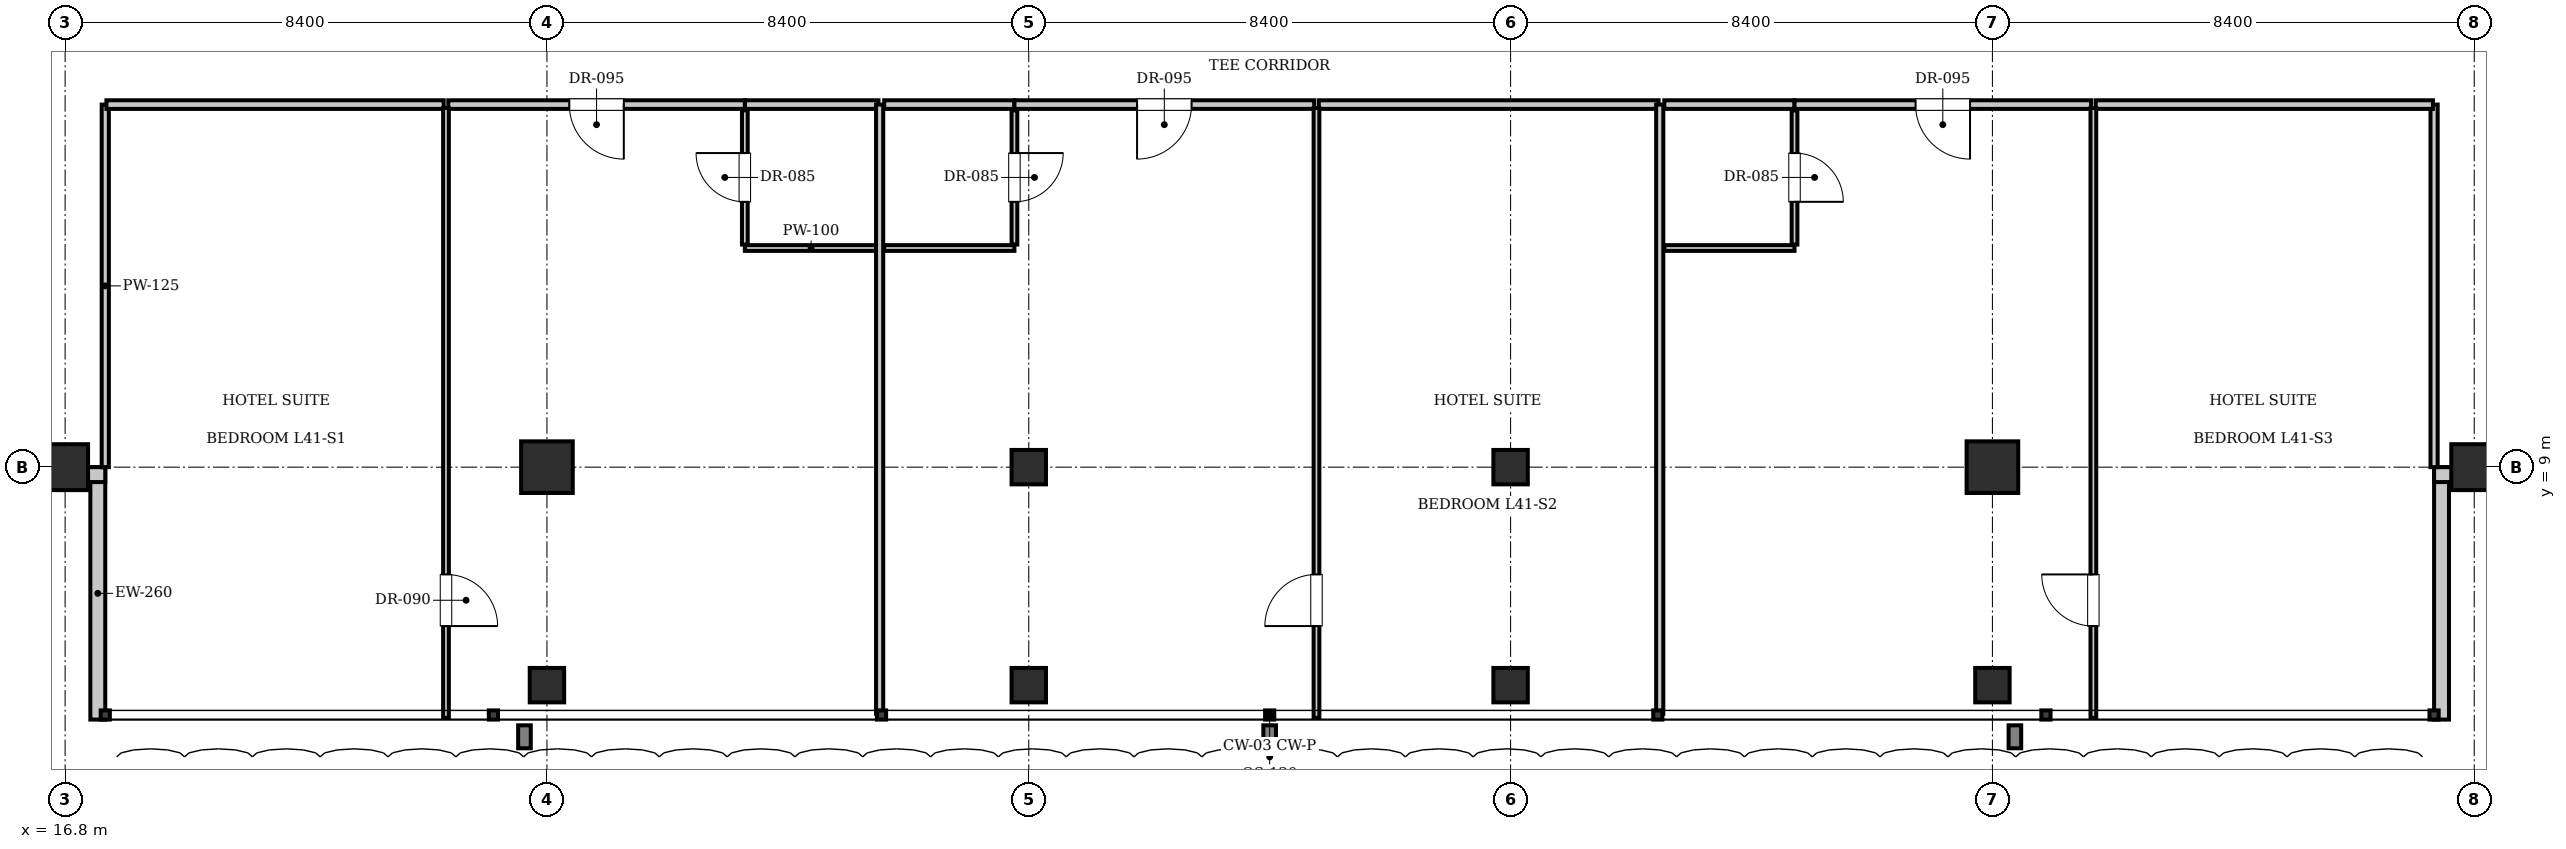
"""IFC4 building model, lengths in metres.
Left out: names, types, materials, properties, quantities, classifications, styles, units other than length and angle.
Written with IfcOpenShell. Run it as: python <this file> out.ifc"""

import sys

from ifc_helpers import new_model, si_unit, direction, frame, frame_2d, origin, origin_2d, place, context, subcontext, project, spatial, rectangle, i_section, extrude, element, fill, save


model = new_model("IFC4")
c1 = context("Model", 3, precision=1e-05, world=origin(), true_north=direction((0.0, 1.0)))
c2 = subcontext(c1, "Body", "Model", "MODEL_VIEW")
j1 = project(units=[si_unit("LENGTHUNIT", "METRE"), si_unit("PLANEANGLEUNIT", "RADIAN")], contexts=[c1])
p1 = place(None, origin())
s1 = spatial("IfcSite", under=j1, at=p1, CompositionType="ELEMENT")
p2 = place(p1, origin())
s2 = spatial("IfcBuilding", under=s1, at=p2, CompositionType="ELEMENT")
p3 = place(p2, frame((0.0, 0.0, 169.75)))
s3 = spatial("IfcBuildingStorey", under=s2, at=p3, CompositionType="ELEMENT", Elevation=169.75)
for number, where, z_axis, x_axis in (
    (1, (25.2, 9.0, 0.0), (0.0, 0.0, 1.0), (1.0, 0.0, 0.0)),
    (2, (50.4, 9.0, 0.0), (0.0, 0.0, 1.0), (1.0, 0.0, 0.0)),
):
    element("IfcColumn", number, at=place(p3, frame(where, z_axis=z_axis, x_axis=x_axis)), inside=s3, PredefinedType="COLUMN", context=c2, shape_type="SweptSolid", body=[
        extrude(rectangle(XDim=0.9, YDim=0.9, at=origin_2d()), origin(), (0.0, 0.0, 1.0), 3.85),
    ])
for number, where, z_axis, x_axis in (
    (3, (33.6, 9.0, 0.0), (0.0, 0.0, 1.0), (1.0, 0.0, 0.0)),
    (4, (42.0, 9.0, 0.0), (0.0, 0.0, 1.0), (1.0, 0.0, 0.0)),
):
    element("IfcColumn", number, at=place(p3, frame(where, z_axis=z_axis, x_axis=x_axis)), inside=s3, PredefinedType="COLUMN", context=c2, shape_type="SweptSolid", body=[
        extrude(i_section(OverallWidth=0.6, OverallDepth=0.6, WebThickness=0.025, FlangeThickness=0.038, at=origin_2d()), origin(), (0.0, 0.0, 1.0), 3.85),
    ])
for number, where, z_axis, x_axis in (
    (5, (16.8, 9.0, 0.0), (0.0, 0.0, 1.0), (1.0, 0.0, 0.0)),
    (6, (58.8, 9.0, 0.0), (0.0, 0.0, 1.0), (1.0, 0.0, 0.0)),
):
    element("IfcColumn", number, at=place(p3, frame(where, z_axis=z_axis, x_axis=x_axis)), inside=s3, PredefinedType="COLUMN", context=c2, shape_type="SweptSolid", body=[
        extrude(rectangle(XDim=0.8, YDim=0.8, at=origin_2d()), origin(), (0.0, 0.0, 1.0), 3.85),
    ])
for number, where, z_axis, x_axis in (
    (7, (25.2, 5.2, 0.0), (0.0, 0.0, 1.0), (1.0, 0.0, 0.0)),
    (8, (33.6, 5.2, 0.0), (0.0, 0.0, 1.0), (1.0, 0.0, 0.0)),
    (9, (42.0, 5.2, 0.0), (0.0, 0.0, 1.0), (1.0, 0.0, 0.0)),
    (10, (50.4, 5.2, 0.0), (0.0, 0.0, 1.0), (1.0, 0.0, 0.0)),
):
    element("IfcColumn", number, at=place(p3, frame(where, z_axis=z_axis, x_axis=x_axis)), inside=s3, PredefinedType="COLUMN", context=c2, shape_type="SweptSolid", body=[
        extrude(i_section(OverallWidth=0.6, OverallDepth=0.6, WebThickness=0.025, FlangeThickness=0.038, at=origin_2d()), origin(), (0.0, 0.0, 1.0), 3.85),
    ])
p4 = place(p3, frame((17.37, 4.6, 0.0), z_axis=(0.0, 0.0, 1.0), x_axis=(0.0, 1.0, 0.0)))
e11 = element("IfcWall", 11, at=p4, inside=s3, PredefinedType="SOLIDWALL", context=c2, shape_type="SweptSolid", body=[
    extrude(rectangle(XDim=4.4, YDim=0.26, at=frame_2d((2.2, 0.0))), origin(), (0.0, 0.0, 1.0), 3.61),
])
p5 = place(p3, frame((17.5, 8.87, 0.0), z_axis=(0.0, 0.0, 1.0), x_axis=(-1.0, 0.0, 0.0)))
e12 = element("IfcWall", 12, at=p5, inside=s3, PredefinedType="SOLIDWALL", context=c2, shape_type="SweptSolid", body=[
    extrude(rectangle(XDim=4.4, YDim=0.26, at=frame_2d((2.2, 0.0))), origin(), (0.0, 0.0, 1.0), 3.007),
])
p6 = place(p3, frame((58.23, 9.0, 0.0), z_axis=(0.0, 0.0, 1.0), x_axis=(0.0, -1.0, 0.0)))
e13 = element("IfcWall", 13, at=p6, inside=s3, PredefinedType="SOLIDWALL", context=c2, shape_type="SweptSolid", body=[
    extrude(rectangle(XDim=4.4, YDim=0.26, at=frame_2d((2.2, 0.0))), origin(), (0.0, 0.0, 1.0), 3.61),
])
p7 = place(p3, frame((62.5, 8.87, 0.0), z_axis=(0.0, 0.0, 1.0), x_axis=(-1.0, 0.0, 0.0)))
e14 = element("IfcWall", 14, at=p7, inside=s3, PredefinedType="SOLIDWALL", context=c2, shape_type="SweptSolid", body=[
    extrude(rectangle(XDim=4.4, YDim=0.26, at=frame_2d((2.2, 0.0))), origin(), (0.0, 0.0, 1.0), 3.007),
])
for number, where, z_axis, x_axis in (
    (15, (17.5, 9.0, 0.0), (0.0, 0.0, 1.0), (0.0, 1.0, 0.0)),
    (16, (58.1, 9.0, 0.0), (0.0, 0.0, 1.0), (0.0, 1.0, 0.0)),
):
    element("IfcWall", number, at=place(p3, frame(where, z_axis=z_axis, x_axis=x_axis)), inside=s3, PredefinedType="PARTITIONING", context=c2, shape_type="SweptSolid", body=[
        extrude(rectangle(XDim=6.32, YDim=0.125, at=frame_2d((3.16, 0.0))), origin(), (0.0, 0.0, 1.0), 3.61),
    ])
p8 = place(p3, frame((28.65, 15.32, 0.0), z_axis=(0.0, 0.0, 1.0), x_axis=(1.0, 0.0, 0.0)))
e17 = element("IfcWall", 17, at=p8, inside=s3, PredefinedType="PARTITIONING", context=c2, shape_type="SweptSolid", body=[
    extrude(rectangle(XDim=2.33, YDim=0.15, at=frame_2d((1.165, 0.0))), origin(), (0.0, 0.0, 1.0), 3.61),
])
p9 = place(p3, frame((28.65, 12.82, 0.0), z_axis=(0.0, 0.0, 1.0), x_axis=(1.0, 0.0, 0.0)))
e18 = element("IfcWall", 18, at=p9, inside=s3, PredefinedType="PARTITIONING", context=c2, shape_type="SweptSolid", body=[
    extrude(rectangle(XDim=2.31, YDim=0.1, at=frame_2d((1.155, 0.0))), origin(), (0.0, 0.0, 1.0), 3.61),
])
p10 = place(p3, frame((28.65, 12.88, 0.0), z_axis=(0.0, 0.0, 1.0), x_axis=(0.0, 1.0, 0.0)))
e19 = element("IfcWall", 19, at=p10, inside=s3, PredefinedType="PARTITIONING", context=c2, shape_type="SweptSolid", body=[
    extrude(rectangle(XDim=2.34, YDim=0.1, at=frame_2d((1.17, 0.0))), origin(), (0.0, 0.0, 1.0), 3.61),
])
p11 = place(p10, frame((0.745, 0.0, 0.0)))
e20 = element("IfcOpeningElement", 20, at=p11, cuts=e19, PredefinedType="OPENING", context=c2, shape_type="SweptSolid", body=[
    extrude(rectangle(XDim=0.85, YDim=2.1, at=frame_2d((0.425, 1.05))), frame((0.0, 0.06, 0.0), z_axis=(0.0, -1.0, 0.0), x_axis=(1.0, 0.0, 0.0)), (0.0, 0.0, 1.0), 0.12),
])
p12 = place(p3, frame((17.52, 15.32, 0.0), z_axis=(0.0, 0.0, 1.0), x_axis=(1.0, 0.0, 0.0)))
e21 = element("IfcWall", 21, at=p12, inside=s3, PredefinedType="PARTITIONING", context=c2, shape_type="SweptSolid", body=[
    extrude(rectangle(XDim=5.88, YDim=0.15, at=frame_2d((2.94, 0.0))), origin(), (0.0, 0.0, 1.0), 3.61),
])
p13 = place(p3, frame((23.48, 15.32, 0.0), z_axis=(0.0, 0.0, 1.0), x_axis=(1.0, 0.0, 0.0)))
e22 = element("IfcWall", 22, at=p13, inside=s3, PredefinedType="PARTITIONING", context=c2, shape_type="SweptSolid", body=[
    extrude(rectangle(XDim=5.17, YDim=0.15, at=frame_2d((2.585, 0.0))), origin(), (0.0, 0.0, 1.0), 3.61),
])
p14 = place(p13, frame((2.11, 0.0, 0.0)))
e23 = element("IfcOpeningElement", 23, at=p14, cuts=e22, PredefinedType="OPENING", context=c2, shape_type="SweptSolid", body=[
    extrude(rectangle(XDim=0.95, YDim=2.15, at=frame_2d((0.475, 1.075))), frame((0.0, 0.085, 0.0), z_axis=(0.0, -1.0, 0.0), x_axis=(1.0, 0.0, 0.0)), (0.0, 0.0, 1.0), 0.17),
])
p15 = place(p3, frame((23.44, 4.63, 0.0), z_axis=(0.0, 0.0, 1.0), x_axis=(0.0, 1.0, 0.0)))
e24 = element("IfcWall", 24, at=p15, inside=s3, PredefinedType="PARTITIONING", context=c2, shape_type="SweptSolid", body=[
    extrude(rectangle(XDim=10.63, YDim=0.1, at=frame_2d((5.315, 0.0))), origin(), (0.0, 0.0, 1.0), 3.61),
])
p16 = place(p15, frame((1.6, 0.0, 0.0)))
e25 = element("IfcOpeningElement", 25, at=p16, cuts=e24, PredefinedType="OPENING", context=c2, shape_type="SweptSolid", body=[
    extrude(rectangle(XDim=0.9, YDim=2.1, at=frame_2d((0.45, 1.05))), frame((0.0, 0.06, 0.0), z_axis=(0.0, -1.0, 0.0), x_axis=(1.0, 0.0, 0.0)), (0.0, 0.0, 1.0), 0.12),
])
p17 = place(p3, frame((31.0, 4.7, 0.0), z_axis=(0.0, 0.0, 1.0), x_axis=(0.0, 1.0, 0.0)))
e26 = element("IfcWall", 26, at=p17, inside=s3, PredefinedType="PARTITIONING", context=c2, shape_type="SweptSolid", body=[
    extrude(rectangle(XDim=10.62, YDim=0.125, at=frame_2d((5.31, 0.0))), origin(), (0.0, 0.0, 1.0), 3.61),
])
p18 = place(p3, frame((31.08, 15.32, 0.0), z_axis=(0.0, 0.0, 1.0), x_axis=(1.0, 0.0, 0.0)))
e27 = element("IfcWall", 27, at=p18, inside=s3, PredefinedType="PARTITIONING", context=c2, shape_type="SweptSolid", body=[
    extrude(rectangle(XDim=2.27, YDim=0.15, at=frame_2d((1.135, 0.0))), origin(), (0.0, 0.0, 1.0), 3.61),
])
p19 = place(p3, frame((31.08, 12.82, 0.0), z_axis=(0.0, 0.0, 1.0), x_axis=(1.0, 0.0, 0.0)))
e28 = element("IfcWall", 28, at=p19, inside=s3, PredefinedType="PARTITIONING", context=c2, shape_type="SweptSolid", body=[
    extrude(rectangle(XDim=2.27, YDim=0.1, at=frame_2d((1.135, 0.0))), origin(), (0.0, 0.0, 1.0), 3.61),
])
p20 = place(p3, frame((33.35, 12.88, 0.0), z_axis=(0.0, 0.0, 1.0), x_axis=(0.0, 1.0, 0.0)))
e29 = element("IfcWall", 29, at=p20, inside=s3, PredefinedType="PARTITIONING", context=c2, shape_type="SweptSolid", body=[
    extrude(rectangle(XDim=2.34, YDim=0.1, at=frame_2d((1.17, 0.0))), origin(), (0.0, 0.0, 1.0), 3.61),
])
p21 = place(p20, frame((0.745, 0.0, 0.0)))
e30 = element("IfcOpeningElement", 30, at=p21, cuts=e29, PredefinedType="OPENING", context=c2, shape_type="SweptSolid", body=[
    extrude(rectangle(XDim=0.85, YDim=2.1, at=frame_2d((0.425, 1.05))), frame((0.0, 0.06, 0.0), z_axis=(0.0, -1.0, 0.0), x_axis=(1.0, 0.0, 0.0)), (0.0, 0.0, 1.0), 0.12),
])
p22 = place(p3, frame((33.35, 15.32, 0.0), z_axis=(0.0, 0.0, 1.0), x_axis=(1.0, 0.0, 0.0)))
e31 = element("IfcWall", 31, at=p22, inside=s3, PredefinedType="PARTITIONING", context=c2, shape_type="SweptSolid", body=[
    extrude(rectangle(XDim=5.226, YDim=0.15, at=frame_2d((2.613, 0.0))), origin(), (0.0, 0.0, 1.0), 3.61),
])
p23 = place(p22, frame((2.138, 0.0, 0.0)))
e32 = element("IfcOpeningElement", 32, at=p23, cuts=e31, PredefinedType="OPENING", context=c2, shape_type="SweptSolid", body=[
    extrude(rectangle(XDim=0.95, YDim=2.15, at=frame_2d((0.475, 1.075))), frame((0.0, 0.085, 0.0), z_axis=(0.0, -1.0, 0.0), x_axis=(1.0, 0.0, 0.0)), (0.0, 0.0, 1.0), 0.17),
])
p24 = place(p3, frame((38.656, 15.32, 0.0), z_axis=(0.0, 0.0, 1.0), x_axis=(1.0, 0.0, 0.0)))
e33 = element("IfcWall", 33, at=p24, inside=s3, PredefinedType="PARTITIONING", context=c2, shape_type="SweptSolid", body=[
    extrude(rectangle(XDim=5.924, YDim=0.15, at=frame_2d((2.962, 0.0))), origin(), (0.0, 0.0, 1.0), 3.61),
])
p25 = place(p3, frame((38.616, 4.63, 0.0), z_axis=(0.0, 0.0, 1.0), x_axis=(0.0, 1.0, 0.0)))
e34 = element("IfcWall", 34, at=p25, inside=s3, PredefinedType="PARTITIONING", context=c2, shape_type="SweptSolid", body=[
    extrude(rectangle(XDim=10.63, YDim=0.1, at=frame_2d((5.315, 0.0))), origin(), (0.0, 0.0, 1.0), 3.61),
])
p26 = place(p25, frame((1.6, 0.0, 0.0)))
e35 = element("IfcOpeningElement", 35, at=p26, cuts=e34, PredefinedType="OPENING", context=c2, shape_type="SweptSolid", body=[
    extrude(rectangle(XDim=0.9, YDim=2.1, at=frame_2d((0.45, 1.05))), frame((0.0, 0.06, 0.0), z_axis=(0.0, -1.0, 0.0), x_axis=(1.0, 0.0, 0.0)), (0.0, 0.0, 1.0), 0.12),
])
p27 = place(p3, frame((44.6, 4.7, 0.0), z_axis=(0.0, 0.0, 1.0), x_axis=(0.0, 1.0, 0.0)))
e36 = element("IfcWall", 36, at=p27, inside=s3, PredefinedType="PARTITIONING", context=c2, shape_type="SweptSolid", body=[
    extrude(rectangle(XDim=10.62, YDim=0.125, at=frame_2d((5.31, 0.0))), origin(), (0.0, 0.0, 1.0), 3.61),
])
p28 = place(p3, frame((44.68, 15.32, 0.0), z_axis=(0.0, 0.0, 1.0), x_axis=(1.0, 0.0, 0.0)))
e37 = element("IfcWall", 37, at=p28, inside=s3, PredefinedType="PARTITIONING", context=c2, shape_type="SweptSolid", body=[
    extrude(rectangle(XDim=2.27, YDim=0.15, at=frame_2d((1.135, 0.0))), origin(), (0.0, 0.0, 1.0), 3.61),
])
p29 = place(p3, frame((44.68, 12.82, 0.0), z_axis=(0.0, 0.0, 1.0), x_axis=(1.0, 0.0, 0.0)))
e38 = element("IfcWall", 38, at=p29, inside=s3, PredefinedType="PARTITIONING", context=c2, shape_type="SweptSolid", body=[
    extrude(rectangle(XDim=2.27, YDim=0.1, at=frame_2d((1.135, 0.0))), origin(), (0.0, 0.0, 1.0), 3.61),
])
p30 = place(p3, frame((46.95, 12.88, 0.0), z_axis=(0.0, 0.0, 1.0), x_axis=(0.0, 1.0, 0.0)))
e39 = element("IfcWall", 39, at=p30, inside=s3, PredefinedType="PARTITIONING", context=c2, shape_type="SweptSolid", body=[
    extrude(rectangle(XDim=2.34, YDim=0.1, at=frame_2d((1.17, 0.0))), origin(), (0.0, 0.0, 1.0), 3.61),
])
p31 = place(p30, frame((0.745, 0.0, 0.0)))
e40 = element("IfcOpeningElement", 40, at=p31, cuts=e39, PredefinedType="OPENING", context=c2, shape_type="SweptSolid", body=[
    extrude(rectangle(XDim=0.85, YDim=2.1, at=frame_2d((0.425, 1.05))), frame((0.0, 0.06, 0.0), z_axis=(0.0, -1.0, 0.0), x_axis=(1.0, 0.0, 0.0)), (0.0, 0.0, 1.0), 0.12),
])
p32 = place(p3, frame((46.95, 15.32, 0.0), z_axis=(0.0, 0.0, 1.0), x_axis=(1.0, 0.0, 0.0)))
e41 = element("IfcWall", 41, at=p32, inside=s3, PredefinedType="PARTITIONING", context=c2, shape_type="SweptSolid", body=[
    extrude(rectangle(XDim=5.17, YDim=0.15, at=frame_2d((2.585, 0.0))), origin(), (0.0, 0.0, 1.0), 3.61),
])
p33 = place(p32, frame((2.11, 0.0, 0.0)))
e42 = element("IfcOpeningElement", 42, at=p33, cuts=e41, PredefinedType="OPENING", context=c2, shape_type="SweptSolid", body=[
    extrude(rectangle(XDim=0.95, YDim=2.15, at=frame_2d((0.475, 1.075))), frame((0.0, 0.085, 0.0), z_axis=(0.0, -1.0, 0.0), x_axis=(1.0, 0.0, 0.0)), (0.0, 0.0, 1.0), 0.17),
])
p34 = place(p3, frame((52.2, 15.32, 0.0), z_axis=(0.0, 0.0, 1.0), x_axis=(1.0, 0.0, 0.0)))
e43 = element("IfcWall", 43, at=p34, inside=s3, PredefinedType="PARTITIONING", context=c2, shape_type="SweptSolid", body=[
    extrude(rectangle(XDim=5.88, YDim=0.15, at=frame_2d((2.94, 0.0))), origin(), (0.0, 0.0, 1.0), 3.61),
])
p35 = place(p3, frame((52.16, 4.63, 0.0), z_axis=(0.0, 0.0, 1.0), x_axis=(0.0, 1.0, 0.0)))
e44 = element("IfcWall", 44, at=p35, inside=s3, PredefinedType="PARTITIONING", context=c2, shape_type="SweptSolid", body=[
    extrude(rectangle(XDim=10.63, YDim=0.1, at=frame_2d((5.315, 0.0))), origin(), (0.0, 0.0, 1.0), 3.61),
])
p36 = place(p35, frame((1.6, 0.0, 0.0)))
e45 = element("IfcOpeningElement", 45, at=p36, cuts=e44, PredefinedType="OPENING", context=c2, shape_type="SweptSolid", body=[
    extrude(rectangle(XDim=0.9, YDim=2.1, at=frame_2d((0.45, 1.05))), frame((0.0, 0.06, 0.0), z_axis=(0.0, -1.0, 0.0), x_axis=(1.0, 0.0, 0.0)), (0.0, 0.0, 1.0), 0.12),
])
p37 = place(p11, origin())
e46 = element("IfcDoor", 46, at=p37, inside=s3, OperationType="SINGLE_SWING_RIGHT", PredefinedType="DOOR", context=c2, shape_type="SweptSolid", body=[
    extrude(rectangle(XDim=0.85, YDim=2.1, at=frame_2d((0.425, 1.05))), frame((0.0, 0.025, 0.0), z_axis=(0.0, -1.0, 0.0), x_axis=(1.0, 0.0, 0.0)), (0.0, 0.0, 1.0), 0.05),
])
fill(e20, e46)
p38 = place(p14, frame((0.95, 0.0, 0.0), z_axis=(0.0, 0.0, 1.0), x_axis=(-1.0, 0.0, 0.0)))
e47 = element("IfcDoor", 47, at=p38, inside=s3, OperationType="SINGLE_SWING_LEFT", PredefinedType="DOOR", context=c2, shape_type="SweptSolid", body=[
    extrude(rectangle(XDim=0.95, YDim=2.15, at=frame_2d((0.475, 1.075))), frame((0.0, 0.025, 0.0), z_axis=(0.0, -1.0, 0.0), x_axis=(1.0, 0.0, 0.0)), (0.0, 0.0, 1.0), 0.05),
])
fill(e23, e47)
p39 = place(p16, frame((0.9, 0.0, 0.0), z_axis=(0.0, 0.0, 1.0), x_axis=(-1.0, 0.0, 0.0)))
e48 = element("IfcDoor", 48, at=p39, inside=s3, OperationType="SINGLE_SWING_RIGHT", PredefinedType="DOOR", context=c2, shape_type="SweptSolid", body=[
    extrude(rectangle(XDim=0.9, YDim=2.1, at=frame_2d((0.45, 1.05))), frame((0.0, 0.025, 0.0), z_axis=(0.0, -1.0, 0.0), x_axis=(1.0, 0.0, 0.0)), (0.0, 0.0, 1.0), 0.05),
])
fill(e25, e48)
p40 = place(p21, frame((0.85, 0.0, 0.0), z_axis=(0.0, 0.0, 1.0), x_axis=(-1.0, 0.0, 0.0)))
e49 = element("IfcDoor", 49, at=p40, inside=s3, OperationType="SINGLE_SWING_LEFT", PredefinedType="DOOR", context=c2, shape_type="SweptSolid", body=[
    extrude(rectangle(XDim=0.85, YDim=2.1, at=frame_2d((0.425, 1.05))), frame((0.0, 0.025, 0.0), z_axis=(0.0, -1.0, 0.0), x_axis=(1.0, 0.0, 0.0)), (0.0, 0.0, 1.0), 0.05),
])
fill(e30, e49)
p41 = place(p23, frame((0.95, 0.0, 0.0), z_axis=(0.0, 0.0, 1.0), x_axis=(-1.0, 0.0, 0.0)))
e50 = element("IfcDoor", 50, at=p41, inside=s3, OperationType="SINGLE_SWING_RIGHT", PredefinedType="DOOR", context=c2, shape_type="SweptSolid", body=[
    extrude(rectangle(XDim=0.95, YDim=2.15, at=frame_2d((0.475, 1.075))), frame((0.0, 0.025, 0.0), z_axis=(0.0, -1.0, 0.0), x_axis=(1.0, 0.0, 0.0)), (0.0, 0.0, 1.0), 0.05),
])
fill(e32, e50)
p42 = place(p26, origin())
e51 = element("IfcDoor", 51, at=p42, inside=s3, OperationType="SINGLE_SWING_LEFT", PredefinedType="DOOR", context=c2, shape_type="SweptSolid", body=[
    extrude(rectangle(XDim=0.9, YDim=2.1, at=frame_2d((0.45, 1.05))), frame((0.0, 0.025, 0.0), z_axis=(0.0, -1.0, 0.0), x_axis=(1.0, 0.0, 0.0)), (0.0, 0.0, 1.0), 0.05),
])
fill(e35, e51)
p43 = place(p31, frame((0.85, 0.0, 0.0), z_axis=(0.0, 0.0, 1.0), x_axis=(-1.0, 0.0, 0.0)))
e52 = element("IfcDoor", 52, at=p43, inside=s3, OperationType="SINGLE_SWING_RIGHT", PredefinedType="DOOR", context=c2, shape_type="SweptSolid", body=[
    extrude(rectangle(XDim=0.85, YDim=2.1, at=frame_2d((0.425, 1.05))), frame((0.0, 0.025, 0.0), z_axis=(0.0, -1.0, 0.0), x_axis=(1.0, 0.0, 0.0)), (0.0, 0.0, 1.0), 0.05),
])
fill(e40, e52)
p44 = place(p33, frame((0.95, 0.0, 0.0), z_axis=(0.0, 0.0, 1.0), x_axis=(-1.0, 0.0, 0.0)))
e53 = element("IfcDoor", 53, at=p44, inside=s3, OperationType="SINGLE_SWING_LEFT", PredefinedType="DOOR", context=c2, shape_type="SweptSolid", body=[
    extrude(rectangle(XDim=0.95, YDim=2.15, at=frame_2d((0.475, 1.075))), frame((0.0, 0.025, 0.0), z_axis=(0.0, -1.0, 0.0), x_axis=(1.0, 0.0, 0.0)), (0.0, 0.0, 1.0), 0.05),
])
fill(e42, e53)
p45 = place(p36, origin())
e54 = element("IfcDoor", 54, at=p45, inside=s3, OperationType="SINGLE_SWING_RIGHT", PredefinedType="DOOR", context=c2, shape_type="SweptSolid", body=[
    extrude(rectangle(XDim=0.9, YDim=2.1, at=frame_2d((0.45, 1.05))), frame((0.0, 0.025, 0.0), z_axis=(0.0, -1.0, 0.0), x_axis=(1.0, 0.0, 0.0)), (0.0, 0.0, 1.0), 0.05),
])
fill(e45, e54)
save(model, sys.argv[1])
